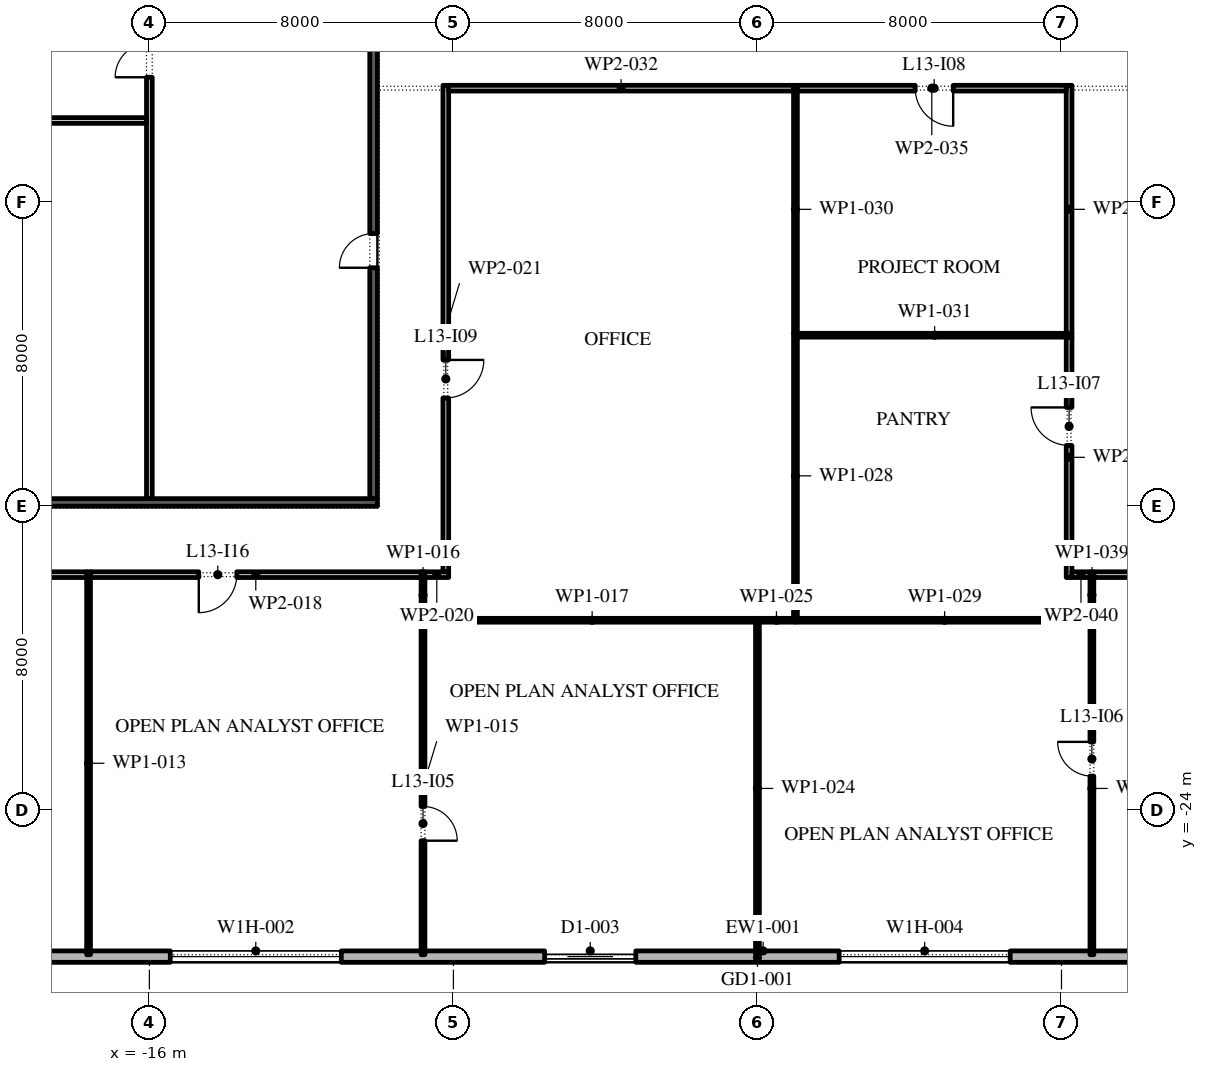
"""IFC4 building model, lengths in metres.
Left out: names, types, materials, properties, quantities, classifications, styles, units other than length and angle.
Written with IfcOpenShell. Run it as: python <this file> out.ifc"""

import sys

from ifc_helpers import new_model, si_unit, direction, frame, frame_2d, origin, place, context, subcontext, project, spatial, rectangle, extrude, element, fill, save


model = new_model("IFC4")
c1 = context("Model", 3, precision=1e-05, world=origin(), true_north=direction((0.0, 1.0)))
c2 = subcontext(c1, "Body", "Model", "MODEL_VIEW")
j1 = project(units=[si_unit("LENGTHUNIT", "METRE"), si_unit("PLANEANGLEUNIT", "RADIAN")], contexts=[c1])
p1 = place(None, origin())
s1 = spatial("IfcSite", under=j1, at=p1, CompositionType="ELEMENT")
p2 = place(p1, origin())
s2 = spatial("IfcBuilding", under=s1, at=p2, CompositionType="ELEMENT")
p3 = place(p2, frame((0.0, 0.0, 64.8)))
s3 = spatial("IfcBuildingStorey", under=s2, at=p3, CompositionType="ELEMENT", Elevation=64.8)
p4 = place(p3, frame((-26.1, -27.85, 0.0), z_axis=(0.0, 0.0, 1.0), x_axis=(1.0, 0.0, 0.0)))
e1 = element("IfcWall", 1, at=p4, inside=s3, PredefinedType="STANDARD", context=c2, shape_type="SweptSolid", body=[
    extrude(rectangle(XDim=52.5, YDim=0.3, at=frame_2d((26.25, 0.0))), origin(), (0.0, 0.0, 1.0), 4.0),
])
p5 = place(p4, frame((2.0, 0.0, 0.45)))
e2 = element("IfcOpeningElement", 2, at=p5, cuts=e1, PredefinedType="OPENING", context=c2, shape_type="SweptSolid", body=[
    extrude(rectangle(XDim=4.5, YDim=2.75, at=frame_2d((2.25, 1.375))), frame((0.0, 0.16, 0.0), z_axis=(0.0, -1.0, 0.0), x_axis=(1.0, 0.0, 0.0)), (0.0, 0.0, 1.0), 0.32),
])
p6 = place(p4, frame((10.65, 0.0, 0.45)))
e3 = element("IfcOpeningElement", 3, at=p6, cuts=e1, PredefinedType="OPENING", context=c2, shape_type="SweptSolid", body=[
    extrude(rectangle(XDim=4.5, YDim=2.75, at=frame_2d((2.25, 1.375))), frame((0.0, 0.16, 0.0), z_axis=(0.0, -1.0, 0.0), x_axis=(1.0, 0.0, 0.0)), (0.0, 0.0, 1.0), 0.32),
])
p7 = place(p4, frame((20.5, 0.0, 0.0)))
e4 = element("IfcOpeningElement", 4, at=p7, cuts=e1, PredefinedType="OPENING", context=c2, shape_type="SweptSolid", body=[
    extrude(rectangle(XDim=2.4, YDim=3.5, at=frame_2d((1.2, 1.75))), frame((0.0, 0.16, 0.0), z_axis=(0.0, -1.0, 0.0), x_axis=(1.0, 0.0, 0.0)), (0.0, 0.0, 1.0), 0.32),
])
p8 = place(p4, frame((28.25, 0.0, 0.45)))
e5 = element("IfcOpeningElement", 5, at=p8, cuts=e1, PredefinedType="OPENING", context=c2, shape_type="SweptSolid", body=[
    extrude(rectangle(XDim=4.5, YDim=2.75, at=frame_2d((2.25, 1.375))), frame((0.0, 0.16, 0.0), z_axis=(0.0, -1.0, 0.0), x_axis=(1.0, 0.0, 0.0)), (0.0, 0.0, 1.0), 0.32),
])
p9 = place(p4, frame((37.05, 0.0, 0.45)))
e6 = element("IfcOpeningElement", 6, at=p9, cuts=e1, PredefinedType="OPENING", context=c2, shape_type="SweptSolid", body=[
    extrude(rectangle(XDim=4.5, YDim=2.75, at=frame_2d((2.25, 1.375))), frame((0.0, 0.16, 0.0), z_axis=(0.0, -1.0, 0.0), x_axis=(1.0, 0.0, 0.0)), (0.0, 0.0, 1.0), 0.32),
])
p10 = place(p4, frame((45.85, 0.0, 0.45)))
e7 = element("IfcOpeningElement", 7, at=p10, cuts=e1, PredefinedType="OPENING", context=c2, shape_type="SweptSolid", body=[
    extrude(rectangle(XDim=4.5, YDim=2.75, at=frame_2d((2.25, 1.375))), frame((0.0, 0.16, 0.0), z_axis=(0.0, -1.0, 0.0), x_axis=(1.0, 0.0, 0.0)), (0.0, 0.0, 1.0), 0.32),
])
p11 = place(p3, frame((-10.1, -15.8, 0.0), z_axis=(0.0, 0.0, 1.0), x_axis=(0.0, 1.0, 0.0)))
e8 = element("IfcWall", 8, at=p11, inside=s3, PredefinedType="SHEAR", context=c2, shape_type="SweptSolid", body=[
    extrude(rectangle(XDim=13.05, YDim=0.2, at=frame_2d((6.525, 0.0))), origin(), (0.0, 0.0, 1.0), 4.0),
])
p12 = place(p11, frame((6.075, 0.0, 0.0)))
e9 = element("IfcOpeningElement", 9, at=p12, cuts=e8, PredefinedType="OPENING", context=c2, shape_type="SweptSolid", body=[
    extrude(rectangle(XDim=0.9, YDim=2.1, at=frame_2d((0.45, 1.05))), frame((0.0, 0.11, 0.0), z_axis=(0.0, -1.0, 0.0), x_axis=(1.0, 0.0, 0.0)), (0.0, 0.0, 1.0), 0.22),
])
p13 = place(p3, frame((-22.0, -15.9, 0.0), z_axis=(0.0, 0.0, 1.0), x_axis=(1.0, 0.0, 0.0)))
e10 = element("IfcWall", 10, at=p13, inside=s3, PredefinedType="SHEAR", context=c2, shape_type="SweptSolid", body=[
    extrude(rectangle(XDim=12.0, YDim=0.2, at=frame_2d((6.0, 0.0))), origin(), (0.0, 0.0, 1.0), 4.0),
])
p14 = place(p3, frame((-16.0, -15.8, 0.0), z_axis=(0.0, 0.0, 1.0), x_axis=(0.0, 1.0, 0.0)))
e11 = element("IfcWall", 11, at=p14, inside=s3, PredefinedType="PARTITIONING", context=c2, shape_type="SweptSolid", body=[
    extrude(rectangle(XDim=13.05, YDim=0.15, at=frame_2d((6.525, 0.0))), origin(), (0.0, 0.0, 1.0), 4.0),
])
p15 = place(p14, frame((11.087, 0.0, 0.0)))
e12 = element("IfcOpeningElement", 12, at=p15, cuts=e11, PredefinedType="OPENING", context=c2, shape_type="SweptSolid", body=[
    extrude(rectangle(XDim=0.9, YDim=2.1, at=frame_2d((0.45, 1.05))), frame((0.0, 0.085, 0.0), z_axis=(0.0, -1.0, 0.0), x_axis=(1.0, 0.0, 0.0)), (0.0, 0.0, 1.0), 0.17),
])
p16 = place(p3, frame((-21.8, -5.85, 0.0), z_axis=(0.0, 0.0, 1.0), x_axis=(1.0, 0.0, 0.0)))
e13 = element("IfcWall", 13, at=p16, inside=s3, PredefinedType="PARTITIONING", context=c2, shape_type="SweptSolid", body=[
    extrude(rectangle(XDim=5.725, YDim=0.15, at=frame_2d((2.863, 0.0))), origin(), (0.0, 0.0, 1.0), 4.0),
])
p17 = place(p3, frame((-17.6, -27.8, 0.0), z_axis=(0.0, 0.0, 1.0), x_axis=(0.0, 1.0, 0.0)))
e14 = element("IfcWall", 14, at=p17, inside=s3, PredefinedType="PARTITIONING", context=c2, shape_type="SweptSolid", body=[
    extrude(rectangle(XDim=10.075, YDim=0.1, at=frame_2d((5.038, 0.0))), origin(), (0.0, 0.0, 1.0), 4.0),
])
p18 = place(p3, frame((-17.65, -17.8, 0.0), z_axis=(0.0, 0.0, 1.0), x_axis=(-1.0, 0.0, 0.0)))
e15 = element("IfcWall", 15, at=p18, inside=s3, PredefinedType="PARTITIONING", context=c2, shape_type="SweptSolid", body=[
    extrude(rectangle(XDim=6.075, YDim=0.15, at=frame_2d((3.038, 0.0))), origin(), (0.0, 0.0, 1.0), 4.0),
])
p19 = place(p18, frame((3.25, 0.0, 0.0)))
e16 = element("IfcOpeningElement", 16, at=p19, cuts=e15, PredefinedType="OPENING", context=c2, shape_type="SweptSolid", body=[
    extrude(rectangle(XDim=1.0, YDim=2.1, at=frame_2d((0.5, 1.05))), frame((0.0, 0.085, 0.0), z_axis=(0.0, -1.0, 0.0), x_axis=(1.0, 0.0, 0.0)), (0.0, 0.0, 1.0), 0.17),
])
p20 = place(p3, frame((-8.8, -27.8, 0.0), z_axis=(0.0, 0.0, 1.0), x_axis=(0.0, 1.0, 0.0)))
e17 = element("IfcWall", 17, at=p20, inside=s3, PredefinedType="PARTITIONING", context=c2, shape_type="SweptSolid", body=[
    extrude(rectangle(XDim=8.85, YDim=0.1, at=frame_2d((4.425, 0.0))), origin(), (0.0, 0.0, 1.0), 4.0),
])
p21 = place(p20, frame((3.0, 0.0, 0.0)))
e18 = element("IfcOpeningElement", 18, at=p21, cuts=e17, PredefinedType="OPENING", context=c2, shape_type="SweptSolid", body=[
    extrude(rectangle(XDim=0.9, YDim=2.1, at=frame_2d((0.45, 1.05))), frame((0.0, 0.06, 0.0), z_axis=(0.0, -1.0, 0.0), x_axis=(1.0, 0.0, 0.0)), (0.0, 0.0, 1.0), 0.12),
])
p22 = place(p3, frame((-8.8, -18.95, 0.0), z_axis=(0.0, 0.0, 1.0), x_axis=(0.0, 1.0, 0.0)))
e19 = element("IfcWall", 19, at=p22, inside=s3, PredefinedType="PARTITIONING", context=c2, shape_type="SweptSolid", body=[
    extrude(rectangle(XDim=1.225, YDim=0.1, at=frame_2d((0.612, 0.0))), origin(), (0.0, 0.0, 1.0), 4.0),
])
p23 = place(p3, frame((-8.75, -19.0, 0.0), z_axis=(0.0, 0.0, 1.0), x_axis=(1.0, 0.0, 0.0)))
e20 = element("IfcWall", 20, at=p23, inside=s3, PredefinedType="PARTITIONING", context=c2, shape_type="SweptSolid", body=[
    extrude(rectangle(XDim=8.8, YDim=0.1, at=frame_2d((4.4, 0.0))), origin(), (0.0, 0.0, 1.0), 4.0),
])
p24 = place(p3, frame((-8.85, -17.8, 0.0), z_axis=(0.0, 0.0, 1.0), x_axis=(-1.0, 0.0, 0.0)))
e21 = element("IfcWall", 21, at=p24, inside=s3, PredefinedType="PARTITIONING", context=c2, shape_type="SweptSolid", body=[
    extrude(rectangle(XDim=8.7, YDim=0.15, at=frame_2d((4.35, 0.0))), origin(), (0.0, 0.0, 1.0), 4.0),
])
p25 = place(p24, frame((4.85, 0.0, 0.0)))
e22 = element("IfcOpeningElement", 22, at=p25, cuts=e21, PredefinedType="OPENING", context=c2, shape_type="SweptSolid", body=[
    extrude(rectangle(XDim=1.0, YDim=2.1, at=frame_2d((0.5, 1.05))), frame((0.0, 0.085, 0.0), z_axis=(0.0, -1.0, 0.0), x_axis=(1.0, 0.0, 0.0)), (0.0, 0.0, 1.0), 0.17),
])
p26 = place(p3, frame((-8.125, -17.8, 0.0), z_axis=(0.0, 0.0, 1.0), x_axis=(-1.0, 0.0, 0.0)))
e23 = element("IfcWall", 23, at=p26, inside=s3, PredefinedType="PARTITIONING", context=c2, shape_type="SweptSolid", body=[
    extrude(rectangle(XDim=0.625, YDim=0.15, at=frame_2d((0.312, 0.0))), origin(), (0.0, 0.0, 1.0), 4.0),
])
p27 = place(p3, frame((-8.2, -4.925, 0.0), z_axis=(0.0, 0.0, 1.0), x_axis=(0.0, -1.0, 0.0)))
e24 = element("IfcWall", 24, at=p27, inside=s3, PredefinedType="PARTITIONING", context=c2, shape_type="SweptSolid", body=[
    extrude(rectangle(XDim=12.8, YDim=0.15, at=frame_2d((6.4, 0.0))), origin(), (0.0, 0.0, 1.0), 4.0),
])
p28 = place(p27, frame((7.225, 0.0, 0.0)))
e25 = element("IfcOpeningElement", 25, at=p28, cuts=e24, PredefinedType="OPENING", context=c2, shape_type="SweptSolid", body=[
    extrude(rectangle(XDim=1.0, YDim=2.1, at=frame_2d((0.5, 1.05))), frame((0.0, 0.085, 0.0), z_axis=(0.0, -1.0, 0.0), x_axis=(1.0, 0.0, 0.0)), (0.0, 0.0, 1.0), 0.17),
])
p29 = place(p3, frame((0.0, -19.05, 0.0), z_axis=(0.0, 0.0, 1.0), x_axis=(0.0, -1.0, 0.0)))
e26 = element("IfcWall", 26, at=p29, inside=s3, PredefinedType="PARTITIONING", context=c2, shape_type="SweptSolid", body=[
    extrude(rectangle(XDim=8.75, YDim=0.1, at=frame_2d((4.375, 0.0))), origin(), (0.0, 0.0, 1.0), 4.0),
])
p30 = place(p3, frame((0.0, -19.0, 0.0), z_axis=(0.0, 0.0, 1.0), x_axis=(1.0, 0.0, 0.0)))
e27 = element("IfcWall", 27, at=p30, inside=s3, PredefinedType="PARTITIONING", context=c2, shape_type="SweptSolid", body=[
    extrude(rectangle(XDim=1.0, YDim=0.1, at=frame_2d((0.5, 0.0))), origin(), (0.0, 0.0, 1.0), 4.0),
])
p31 = place(p3, frame((1.0, -18.95, 0.0), z_axis=(0.0, 0.0, 1.0), x_axis=(0.0, 1.0, 0.0)))
e28 = element("IfcWall", 28, at=p31, inside=s3, PredefinedType="PARTITIONING", context=c2, shape_type="SweptSolid", body=[
    extrude(rectangle(XDim=7.5, YDim=0.1, at=frame_2d((3.75, 0.0))), origin(), (0.0, 0.0, 1.0), 4.0),
])
p32 = place(p3, frame((1.0, -19.0, 0.0), z_axis=(0.0, 0.0, 1.0), x_axis=(1.0, 0.0, 0.0)))
e29 = element("IfcWall", 29, at=p32, inside=s3, PredefinedType="PARTITIONING", context=c2, shape_type="SweptSolid", body=[
    extrude(rectangle(XDim=7.85, YDim=0.1, at=frame_2d((3.925, 0.0))), origin(), (0.0, 0.0, 1.0), 4.0),
])
p33 = place(p3, frame((1.0, -11.45, 0.0), z_axis=(0.0, 0.0, 1.0), x_axis=(0.0, 1.0, 0.0)))
e30 = element("IfcWall", 30, at=p33, inside=s3, PredefinedType="PARTITIONING", context=c2, shape_type="SweptSolid", body=[
    extrude(rectangle(XDim=6.525, YDim=0.1, at=frame_2d((3.262, 0.0))), origin(), (0.0, 0.0, 1.0), 4.0),
])
p34 = place(p3, frame((1.05, -11.5, 0.0), z_axis=(0.0, 0.0, 1.0), x_axis=(1.0, 0.0, 0.0)))
e31 = element("IfcWall", 31, at=p34, inside=s3, PredefinedType="PARTITIONING", context=c2, shape_type="SweptSolid", body=[
    extrude(rectangle(XDim=7.225, YDim=0.1, at=frame_2d((3.612, 0.0))), origin(), (0.0, 0.0, 1.0), 4.0),
])
p35 = place(p3, frame((0.95, -5.0, 0.0), z_axis=(0.0, 0.0, 1.0), x_axis=(-1.0, 0.0, 0.0)))
e32 = element("IfcWall", 32, at=p35, inside=s3, PredefinedType="PARTITIONING", context=c2, shape_type="SweptSolid", body=[
    extrude(rectangle(XDim=9.075, YDim=0.15, at=frame_2d((4.538, 0.0))), origin(), (0.0, 0.0, 1.0), 4.0),
])
p36 = place(p3, frame((8.2, -17.875, 0.0), z_axis=(0.0, 0.0, 1.0), x_axis=(0.0, 1.0, 0.0)))
e33 = element("IfcWall", 33, at=p36, inside=s3, PredefinedType="PARTITIONING", context=c2, shape_type="SweptSolid", body=[
    extrude(rectangle(XDim=6.325, YDim=0.15, at=frame_2d((3.163, 0.0))), origin(), (0.0, 0.0, 1.0), 4.0),
])
p37 = place(p36, frame((3.475, 0.0, 0.0)))
e34 = element("IfcOpeningElement", 34, at=p37, cuts=e33, PredefinedType="OPENING", context=c2, shape_type="SweptSolid", body=[
    extrude(rectangle(XDim=1.0, YDim=2.1, at=frame_2d((0.5, 1.05))), frame((0.0, 0.085, 0.0), z_axis=(0.0, -1.0, 0.0), x_axis=(1.0, 0.0, 0.0)), (0.0, 0.0, 1.0), 0.17),
])
p38 = place(p3, frame((8.2, -11.45, 0.0), z_axis=(0.0, 0.0, 1.0), x_axis=(0.0, 1.0, 0.0)))
e35 = element("IfcWall", 35, at=p38, inside=s3, PredefinedType="PARTITIONING", context=c2, shape_type="SweptSolid", body=[
    extrude(rectangle(XDim=6.525, YDim=0.15, at=frame_2d((3.262, 0.0))), origin(), (0.0, 0.0, 1.0), 4.0),
])
p39 = place(p3, frame((8.125, -5.0, 0.0), z_axis=(0.0, 0.0, 1.0), x_axis=(-1.0, 0.0, 0.0)))
e36 = element("IfcWall", 36, at=p39, inside=s3, PredefinedType="PARTITIONING", context=c2, shape_type="SweptSolid", body=[
    extrude(rectangle(XDim=7.075, YDim=0.15, at=frame_2d((3.538, 0.0))), origin(), (0.0, 0.0, 1.0), 4.0),
])
p40 = place(p39, frame((2.975, 0.0, 0.0)))
e37 = element("IfcOpeningElement", 37, at=p40, cuts=e36, PredefinedType="OPENING", context=c2, shape_type="SweptSolid", body=[
    extrude(rectangle(XDim=1.0, YDim=2.1, at=frame_2d((0.5, 1.05))), frame((0.0, 0.085, 0.0), z_axis=(0.0, -1.0, 0.0), x_axis=(1.0, 0.0, 0.0)), (0.0, 0.0, 1.0), 0.17),
])
p41 = place(p3, frame((8.8, -27.8, 0.0), z_axis=(0.0, 0.0, 1.0), x_axis=(0.0, 1.0, 0.0)))
e38 = element("IfcWall", 38, at=p41, inside=s3, PredefinedType="PARTITIONING", context=c2, shape_type="SweptSolid", body=[
    extrude(rectangle(XDim=8.75, YDim=0.1, at=frame_2d((4.375, 0.0))), origin(), (0.0, 0.0, 1.0), 4.0),
])
p42 = place(p41, frame((4.7, 0.0, 0.0)))
e39 = element("IfcOpeningElement", 39, at=p42, cuts=e38, PredefinedType="OPENING", context=c2, shape_type="SweptSolid", body=[
    extrude(rectangle(XDim=0.9, YDim=2.1, at=frame_2d((0.45, 1.05))), frame((0.0, 0.06, 0.0), z_axis=(0.0, -1.0, 0.0), x_axis=(1.0, 0.0, 0.0)), (0.0, 0.0, 1.0), 0.12),
])
p43 = place(p3, frame((8.8, -18.95, 0.0), z_axis=(0.0, 0.0, 1.0), x_axis=(0.0, 1.0, 0.0)))
e40 = element("IfcWall", 40, at=p43, inside=s3, PredefinedType="PARTITIONING", context=c2, shape_type="SweptSolid", body=[
    extrude(rectangle(XDim=1.225, YDim=0.1, at=frame_2d((0.612, 0.0))), origin(), (0.0, 0.0, 1.0), 4.0),
])
p44 = place(p3, frame((8.75, -17.8, 0.0), z_axis=(0.0, 0.0, 1.0), x_axis=(-1.0, 0.0, 0.0)))
e41 = element("IfcWall", 41, at=p44, inside=s3, PredefinedType="PARTITIONING", context=c2, shape_type="SweptSolid", body=[
    extrude(rectangle(XDim=0.475, YDim=0.15, at=frame_2d((0.238, 0.0))), origin(), (0.0, 0.0, 1.0), 4.0),
])
p45 = place(p3, frame((17.65, -17.8, 0.0), z_axis=(0.0, 0.0, 1.0), x_axis=(-1.0, 0.0, 0.0)))
e42 = element("IfcWall", 42, at=p45, inside=s3, PredefinedType="PARTITIONING", context=c2, shape_type="SweptSolid", body=[
    extrude(rectangle(XDim=8.8, YDim=0.15, at=frame_2d((4.4, 0.0))), origin(), (0.0, 0.0, 1.0), 4.0),
])
p46 = place(p45, frame((5.7, 0.0, 0.0)))
e43 = element("IfcOpeningElement", 43, at=p46, cuts=e42, PredefinedType="OPENING", context=c2, shape_type="SweptSolid", body=[
    extrude(rectangle(XDim=1.0, YDim=2.1, at=frame_2d((0.5, 1.05))), frame((0.0, 0.085, 0.0), z_axis=(0.0, -1.0, 0.0), x_axis=(1.0, 0.0, 0.0)), (0.0, 0.0, 1.0), 0.17),
])
p47 = place(p6, origin())
e44 = element("IfcWindow", 44, at=p47, inside=s3, PartitioningType="DOUBLE_PANEL_VERTICAL", PredefinedType="WINDOW", context=c2, shape_type="SweptSolid", body=[
    extrude(rectangle(XDim=4.5, YDim=2.75, at=frame_2d((2.25, 1.375))), frame((0.0, 0.03, 0.0), z_axis=(0.0, -1.0, 0.0), x_axis=(1.0, 0.0, 0.0)), (0.0, 0.0, 1.0), 0.06),
])
fill(e3, e44)
p48 = place(p7, origin())
e45 = element("IfcDoor", 45, at=p48, inside=s3, OperationType="DOUBLE_DOOR_SLIDING", PredefinedType="DOOR", context=c2, shape_type="SweptSolid", body=[
    extrude(rectangle(XDim=2.4, YDim=3.5, at=frame_2d((1.2, 1.75))), frame((0.0, 0.025, 0.0), z_axis=(0.0, -1.0, 0.0), x_axis=(1.0, 0.0, 0.0)), (0.0, 0.0, 1.0), 0.05),
])
fill(e4, e45)
p49 = place(p8, origin())
e46 = element("IfcWindow", 46, at=p49, inside=s3, PartitioningType="DOUBLE_PANEL_VERTICAL", PredefinedType="WINDOW", context=c2, shape_type="SweptSolid", body=[
    extrude(rectangle(XDim=4.5, YDim=2.75, at=frame_2d((2.25, 1.375))), frame((0.0, 0.03, 0.0), z_axis=(0.0, -1.0, 0.0), x_axis=(1.0, 0.0, 0.0)), (0.0, 0.0, 1.0), 0.06),
])
fill(e5, e46)
p50 = place(p15, origin())
e47 = element("IfcDoor", 47, at=p50, inside=s3, OperationType="SINGLE_SWING_RIGHT", PredefinedType="DOOR", context=c2, shape_type="SweptSolid", body=[
    extrude(rectangle(XDim=0.9, YDim=2.1, at=frame_2d((0.45, 1.05))), frame((0.0, 0.025, 0.0), z_axis=(0.0, -1.0, 0.0), x_axis=(1.0, 0.0, 0.0)), (0.0, 0.0, 1.0), 0.05),
])
fill(e12, e47)
p51 = place(p12, origin())
e48 = element("IfcDoor", 48, at=p51, inside=s3, OperationType="SINGLE_SWING_RIGHT", PredefinedType="DOOR", context=c2, shape_type="SweptSolid", body=[
    extrude(rectangle(XDim=0.9, YDim=2.1, at=frame_2d((0.45, 1.05))), frame((0.0, 0.1, 0.0), z_axis=(0.0, -1.0, 0.0), x_axis=(1.0, 0.0, 0.0)), (0.0, 0.0, 1.0), 0.05),
])
fill(e9, e48)
p52 = place(p21, frame((0.9, 0.0, 0.0), z_axis=(0.0, 0.0, 1.0), x_axis=(-1.0, 0.0, 0.0)))
e49 = element("IfcDoor", 49, at=p52, inside=s3, OperationType="SINGLE_SWING_LEFT", PredefinedType="DOOR", context=c2, shape_type="SweptSolid", body=[
    extrude(rectangle(XDim=0.9, YDim=2.1, at=frame_2d((0.45, 1.05))), frame((0.0, 0.025, 0.0), z_axis=(0.0, -1.0, 0.0), x_axis=(1.0, 0.0, 0.0)), (0.0, 0.0, 1.0), 0.05),
])
fill(e18, e49)
p53 = place(p42, origin())
e50 = element("IfcDoor", 50, at=p53, inside=s3, OperationType="SINGLE_SWING_LEFT", PredefinedType="DOOR", context=c2, shape_type="SweptSolid", body=[
    extrude(rectangle(XDim=0.9, YDim=2.1, at=frame_2d((0.45, 1.05))), frame((0.0, 0.025, 0.0), z_axis=(0.0, -1.0, 0.0), x_axis=(1.0, 0.0, 0.0)), (0.0, 0.0, 1.0), 0.05),
])
fill(e39, e50)
p54 = place(p37, origin())
e51 = element("IfcDoor", 51, at=p54, inside=s3, OperationType="SINGLE_SWING_LEFT", PredefinedType="DOOR", context=c2, shape_type="SweptSolid", body=[
    extrude(rectangle(XDim=1.0, YDim=2.1, at=frame_2d((0.5, 1.05))), frame((0.0, 0.025, 0.0), z_axis=(0.0, -1.0, 0.0), x_axis=(1.0, 0.0, 0.0)), (0.0, 0.0, 1.0), 0.05),
])
fill(e34, e51)
p55 = place(p40, origin())
e52 = element("IfcDoor", 52, at=p55, inside=s3, OperationType="SINGLE_SWING_RIGHT", PredefinedType="DOOR", context=c2, shape_type="SweptSolid", body=[
    extrude(rectangle(XDim=1.0, YDim=2.1, at=frame_2d((0.5, 1.05))), frame((0.0, 0.025, 0.0), z_axis=(0.0, -1.0, 0.0), x_axis=(1.0, 0.0, 0.0)), (0.0, 0.0, 1.0), 0.05),
])
fill(e37, e52)
p56 = place(p28, origin())
e53 = element("IfcDoor", 53, at=p56, inside=s3, OperationType="SINGLE_SWING_RIGHT", PredefinedType="DOOR", context=c2, shape_type="SweptSolid", body=[
    extrude(rectangle(XDim=1.0, YDim=2.1, at=frame_2d((0.5, 1.05))), frame((0.0, 0.025, 0.0), z_axis=(0.0, -1.0, 0.0), x_axis=(1.0, 0.0, 0.0)), (0.0, 0.0, 1.0), 0.05),
])
fill(e25, e53)
p57 = place(p25, origin())
e54 = element("IfcDoor", 54, at=p57, inside=s3, OperationType="SINGLE_SWING_LEFT", PredefinedType="DOOR", context=c2, shape_type="SweptSolid", body=[
    extrude(rectangle(XDim=1.0, YDim=2.1, at=frame_2d((0.5, 1.05))), frame((0.0, 0.025, 0.0), z_axis=(0.0, -1.0, 0.0), x_axis=(1.0, 0.0, 0.0)), (0.0, 0.0, 1.0), 0.05),
])
fill(e22, e54)
save(model, sys.argv[1])
